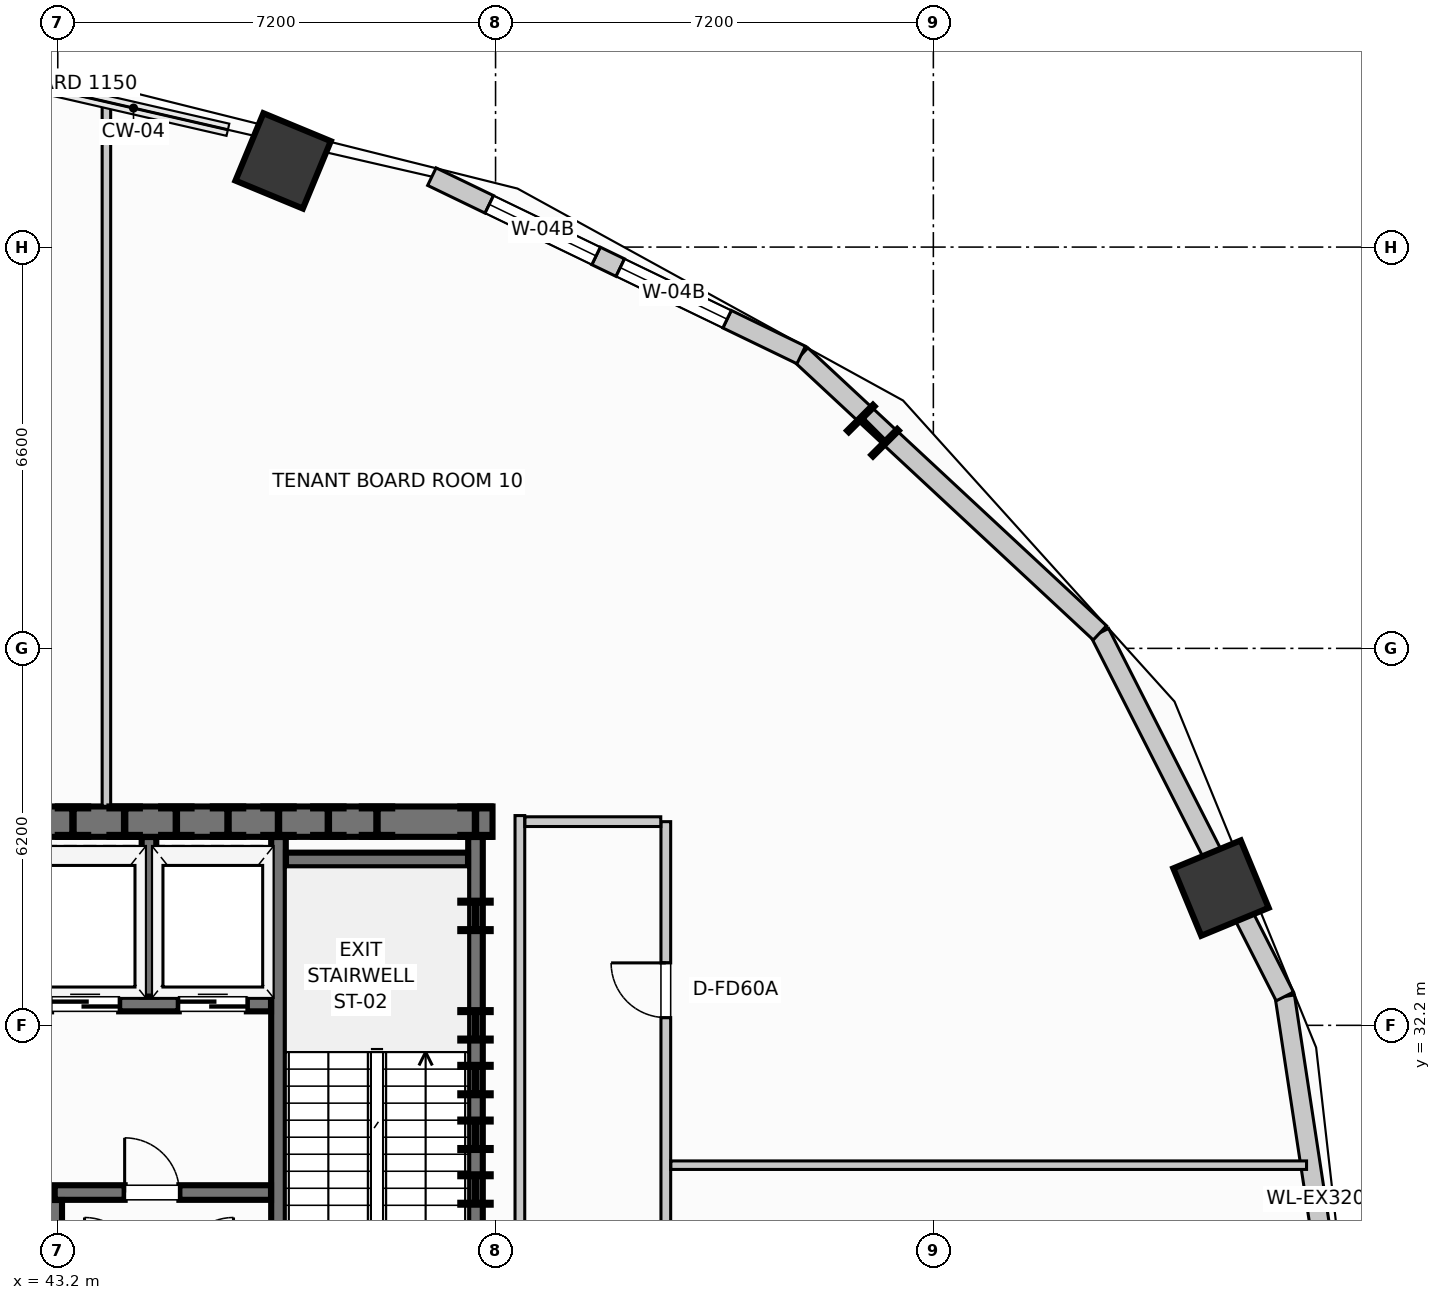
"""IFC4 building model, lengths in metres.
Left out: names, types, materials, properties, quantities, classifications, styles, units other than length and angle.
Written with IfcOpenShell. Run it as: python <this file> out.ifc"""

import sys

from ifc_helpers import new_model, si_unit, direction, frame, frame_2d, origin, origin_2d, place, context, subcontext, project, spatial, rectangle, i_section, extrude, element, fill, save


model = new_model("IFC4")
c1 = context("Model", 3, precision=1e-05, world=origin(), true_north=direction((0.0, 1.0)))
c2 = subcontext(c1, "Body", "Model", "MODEL_VIEW")
j1 = project(units=[si_unit("LENGTHUNIT", "METRE"), si_unit("PLANEANGLEUNIT", "RADIAN")], contexts=[c1])
p1 = place(None, origin())
s1 = spatial("IfcSite", under=j1, at=p1, CompositionType="ELEMENT")
p2 = place(p1, origin())
s2 = spatial("IfcBuilding", under=s1, at=p2, CompositionType="ELEMENT")
p3 = place(p2, frame((0.0, 0.0, 105.95)))
s3 = spatial("IfcBuildingStorey", under=s2, at=p3, CompositionType="ELEMENT", Elevation=105.95)
for number, where, z_axis, x_axis in (
    (1, (43.45, 35.55, 0.0), (0.0, 0.0, 1.0), (1.0, 0.0, 0.0)),
    (2, (45.15, 35.55, 0.0), (0.0, 0.0, 1.0), (1.0, 0.0, 0.0)),
    (3, (46.83, 35.55, 0.0), (0.0, 0.0, 1.0), (1.0, 0.0, 0.0)),
    (4, (48.45, 35.55, 0.0), (0.0, 0.0, 1.0), (1.0, 0.0, 0.0)),
    (5, (50.07, 35.55, 0.0), (0.0, 0.0, 1.0), (1.0, 0.0, 0.0)),
    (6, (50.07, 30.4, 0.0), (0.0, 0.0, 1.0), (1.0, 0.0, 0.0)),
    (7, (50.07, 32.2, 0.0), (0.0, 0.0, 1.0), (1.0, 0.0, 0.0)),
    (8, (50.07, 34.0, 0.0), (0.0, 0.0, 1.0), (1.0, 0.0, 0.0)),
    (9, (47.65, 35.55, 0.0), (0.0, 0.0, 1.0), (1.0, 0.0, 0.0)),
    (10, (44.3, 35.55, 0.0), (0.0, 0.0, 1.0), (1.0, 0.0, 0.0)),
    (11, (46.0, 35.55, 0.0), (0.0, 0.0, 1.0), (1.0, 0.0, 0.0)),
    (12, (50.07, 29.5, 0.0), (0.0, 0.0, 1.0), (1.0, 0.0, 0.0)),
    (13, (50.07, 31.3, 0.0), (0.0, 0.0, 1.0), (1.0, 0.0, 0.0)),
):
    element("IfcColumn", number, at=place(p3, frame(where, z_axis=z_axis, x_axis=x_axis)), inside=s3, PredefinedType="COLUMN", context=c2, shape_type="SweptSolid", body=[
        extrude(i_section(OverallWidth=0.5, OverallDepth=0.5, WebThickness=0.022, FlangeThickness=0.032, at=origin_2d()), origin(), (0.0, 0.0, 1.0), 4.5),
    ])
p4 = place(p3, frame((62.331, 34.457, 0.0), z_axis=(0.0, 0.0, 1.0), x_axis=(0.923879532511, 0.382683432365, 0.0)))
e14 = element("IfcColumn", 14, at=p4, inside=s3, PredefinedType="COLUMN", context=c2, shape_type="SweptSolid", body=[
    extrude(rectangle(XDim=1.2, YDim=1.2, at=origin_2d()), origin(), (0.0, 0.0, 1.0), 4.5),
])
p5 = place(p3, frame((56.607, 41.982, 0.0), z_axis=(0.0, 0.0, 1.0), x_axis=(0.707106781187, 0.707106781187, 0.0)))
e15 = element("IfcColumn", 15, at=p5, inside=s3, PredefinedType="COLUMN", context=c2, shape_type="SweptSolid", body=[
    extrude(i_section(OverallWidth=0.6, OverallDepth=0.6, WebThickness=0.025, FlangeThickness=0.036, at=origin_2d()), origin(), (0.0, 0.0, 1.0), 4.5),
])
p6 = place(p3, frame((46.906, 46.418, 0.0), z_axis=(0.0, 0.0, 1.0), x_axis=(0.382683432365, 0.923879532511, 0.0)))
e16 = element("IfcColumn", 16, at=p6, inside=s3, PredefinedType="COLUMN", context=c2, shape_type="SweptSolid", body=[
    extrude(rectangle(XDim=1.2, YDim=1.2, at=origin_2d()), origin(), (0.0, 0.0, 1.0), 4.5),
])
p7 = place(p3, frame((64.398, 26.0, 0.0), z_axis=(0.0, 0.0, 1.0), x_axis=(-0.150633288003, 0.988589708901, 0.0)))
e17 = element("IfcWall", 17, at=p7, inside=s3, PredefinedType="STANDARD", context=c2, shape_type="SweptSolid", body=[
    extrude(rectangle(XDim=6.752, YDim=0.32, at=frame_2d((3.376, 0.0))), origin(), (0.0, 0.0, 1.0), 4.26),
])
p8 = place(p3, frame((63.381, 32.675, 0.0), z_axis=(0.0, 0.0, 1.0), x_axis=(-0.453374078001, 0.89132033826, 0.0)))
e18 = element("IfcWall", 18, at=p8, inside=s3, PredefinedType="STANDARD", context=c2, shape_type="SweptSolid", body=[
    extrude(rectangle(XDim=6.71, YDim=0.32, at=frame_2d((3.355, 0.0))), origin(), (0.0, 0.0, 1.0), 3.619),
])
p9 = place(p3, frame((60.339, 38.656, 0.0), z_axis=(0.0, 0.0, 1.0), x_axis=(-0.732137360086, 0.681157020052, 0.0)))
e19 = element("IfcWall", 19, at=p9, inside=s3, PredefinedType="STANDARD", context=c2, shape_type="SweptSolid", body=[
    extrude(rectangle(XDim=6.709, YDim=0.32, at=frame_2d((3.354, 0.0))), origin(), (0.0, 0.0, 1.0), 3.619),
])
p10 = place(p3, frame((55.427, 43.226, 0.0), z_axis=(0.0, 0.0, 1.0), x_axis=(-0.900510094661, 0.434835106004, 0.0)))
e20 = element("IfcWall", 20, at=p10, inside=s3, PredefinedType="STANDARD", context=c2, shape_type="SweptSolid", body=[
    extrude(rectangle(XDim=6.745, YDim=0.32, at=frame_2d((3.373, 0.0))), origin(), (0.0, 0.0, 1.0), 4.26),
])
p11 = place(p10, frame((1.354, 0.0, 0.75)))
e21 = element("IfcOpeningElement", 21, at=p11, cuts=e20, PredefinedType="OPENING", context=c2, shape_type="SweptSolid", body=[
    extrude(rectangle(XDim=1.95, YDim=1.68, at=frame_2d((0.975, 0.84))), frame((0.0, 0.17, 0.0), z_axis=(0.0, -1.0, 0.0), x_axis=(1.0, 0.0, 0.0)), (0.0, 0.0, 1.0), 0.34),
])
p12 = place(p10, frame((3.746, 0.0, 0.75)))
e22 = element("IfcOpeningElement", 22, at=p12, cuts=e20, PredefinedType="OPENING", context=c2, shape_type="SweptSolid", body=[
    extrude(rectangle(XDim=1.95, YDim=1.68, at=frame_2d((0.975, 0.84))), frame((0.0, 0.17, 0.0), z_axis=(0.0, -1.0, 0.0), x_axis=(1.0, 0.0, 0.0)), (0.0, 0.0, 1.0), 0.34),
])
p13 = place(p3, frame((50.35, 35.55, 0.0), z_axis=(0.0, 0.0, 1.0), x_axis=(-1.0, 0.0, 0.0)))
e23 = element("IfcWall", 23, at=p13, inside=s3, PredefinedType="SHEAR", context=c2, shape_type="SweptSolid", body=[
    extrude(rectangle(XDim=28.7, YDim=0.5, at=frame_2d((14.35, 0.0))), origin(), (0.0, 0.0, 1.0), 4.5),
])
for number, where, z_axis, x_axis in (
    (24, (50.07, 27.003, 0.0), (0.0, 0.0, 1.0), (0.0, 1.0, 0.0)),
    (25, (46.83, 27.003, 0.0), (0.0, 0.0, 1.0), (0.0, 1.0, 0.0)),
):
    element("IfcWall", number, at=place(p3, frame(where, z_axis=z_axis, x_axis=x_axis)), inside=s3, PredefinedType="SHEAR", context=c2, shape_type="SweptSolid", body=[
        extrude(rectangle(XDim=8.294, YDim=0.24, at=frame_2d((4.147, 0.0))), origin(), (0.0, 0.0, 1.0), 4.5),
    ])
p14 = place(p3, frame((46.953, 34.92, 0.0), z_axis=(0.0, 0.0, 1.0), x_axis=(1.0, 0.0, 0.0)))
e26 = element("IfcWall", 26, at=p14, inside=s3, PredefinedType="SHEAR", context=c2, shape_type="SweptSolid", body=[
    extrude(rectangle(XDim=2.994, YDim=0.24, at=frame_2d((1.497, 0.0))), origin(), (0.0, 0.0, 1.0), 4.5),
])
p15 = place(p3, frame((33.493, 32.55, 0.0), z_axis=(0.0, 0.0, 1.0), x_axis=(1.0, 0.0, 0.0)))
e27 = element("IfcWall", 27, at=p15, inside=s3, PredefinedType="SHEAR", context=c2, shape_type="SweptSolid", body=[
    extrude(rectangle(XDim=13.214, YDim=0.24, at=frame_2d((6.607, 0.0))), origin(), (0.0, 0.0, 1.0), 4.5),
])
p16 = place(p15, frame((0.447, 0.0, 0.0)))
e28 = element("IfcOpeningElement", 28, at=p16, cuts=e27, PredefinedType="OPENING", context=c2, shape_type="SweptSolid", body=[
    extrude(rectangle(XDim=1.12, YDim=2.0, at=frame_2d((0.56, 1.0))), frame((0.0, 0.13, 0.0), z_axis=(0.0, -1.0, 0.0), x_axis=(1.0, 0.0, 0.0)), (0.0, 0.0, 1.0), 0.26),
])
p17 = place(p15, frame((2.547, 0.0, 0.0)))
e29 = element("IfcOpeningElement", 29, at=p17, cuts=e27, PredefinedType="OPENING", context=c2, shape_type="SweptSolid", body=[
    extrude(rectangle(XDim=1.12, YDim=2.0, at=frame_2d((0.56, 1.0))), frame((0.0, 0.13, 0.0), z_axis=(0.0, -1.0, 0.0), x_axis=(1.0, 0.0, 0.0)), (0.0, 0.0, 1.0), 0.26),
])
p18 = place(p15, frame((4.647, 0.0, 0.0)))
e30 = element("IfcOpeningElement", 30, at=p18, cuts=e27, PredefinedType="OPENING", context=c2, shape_type="SweptSolid", body=[
    extrude(rectangle(XDim=1.12, YDim=2.0, at=frame_2d((0.56, 1.0))), frame((0.0, 0.13, 0.0), z_axis=(0.0, -1.0, 0.0), x_axis=(1.0, 0.0, 0.0)), (0.0, 0.0, 1.0), 0.26),
])
p19 = place(p15, frame((7.497, 0.0, 0.0)))
e31 = element("IfcOpeningElement", 31, at=p19, cuts=e27, PredefinedType="OPENING", context=c2, shape_type="SweptSolid", body=[
    extrude(rectangle(XDim=1.12, YDim=2.0, at=frame_2d((0.56, 1.0))), frame((0.0, 0.13, 0.0), z_axis=(0.0, -1.0, 0.0), x_axis=(1.0, 0.0, 0.0)), (0.0, 0.0, 1.0), 0.26),
])
p20 = place(p15, frame((9.597, 0.0, 0.0)))
e32 = element("IfcOpeningElement", 32, at=p20, cuts=e27, PredefinedType="OPENING", context=c2, shape_type="SweptSolid", body=[
    extrude(rectangle(XDim=1.12, YDim=2.0, at=frame_2d((0.56, 1.0))), frame((0.0, 0.13, 0.0), z_axis=(0.0, -1.0, 0.0), x_axis=(1.0, 0.0, 0.0)), (0.0, 0.0, 1.0), 0.26),
])
p21 = place(p15, frame((11.697, 0.0, 0.0)))
e33 = element("IfcOpeningElement", 33, at=p21, cuts=e27, PredefinedType="OPENING", context=c2, shape_type="SweptSolid", body=[
    extrude(rectangle(XDim=1.12, YDim=2.0, at=frame_2d((0.56, 1.0))), frame((0.0, 0.13, 0.0), z_axis=(0.0, -1.0, 0.0), x_axis=(1.0, 0.0, 0.0)), (0.0, 0.0, 1.0), 0.26),
])
p22 = place(p3, frame((43.15, 29.45, 0.0), z_axis=(0.0, 0.0, 1.0), x_axis=(1.0, 0.0, 0.0)))
e34 = element("IfcWall", 34, at=p22, inside=s3, PredefinedType="SHEAR", context=c2, shape_type="SweptSolid", body=[
    extrude(rectangle(XDim=3.557, YDim=0.24, at=frame_2d((1.779, 0.0))), origin(), (0.0, 0.0, 1.0), 4.5),
])
p23 = place(p22, frame((1.15, 0.0, 0.0)))
e35 = element("IfcOpeningElement", 35, at=p23, cuts=e34, PredefinedType="OPENING", context=c2, shape_type="SweptSolid", body=[
    extrude(rectangle(XDim=0.9, YDim=2.0, at=frame_2d((0.45, 1.0))), frame((0.0, 0.13, 0.0), z_axis=(0.0, -1.0, 0.0), x_axis=(1.0, 0.0, 0.0)), (0.0, 0.0, 1.0), 0.26),
])
p24 = place(p3, frame((43.15, 27.003, 0.0), z_axis=(0.0, 0.0, 1.0), x_axis=(0.0, 1.0, 0.0)))
e36 = element("IfcWall", 36, at=p24, inside=s3, PredefinedType="SHEAR", context=c2, shape_type="SweptSolid", body=[
    extrude(rectangle(XDim=2.324, YDim=0.24, at=frame_2d((1.162, 0.0))), origin(), (0.0, 0.0, 1.0), 4.5),
])
p25 = place(p3, frame((44.7, 32.673, 0.0), z_axis=(0.0, 0.0, 1.0), x_axis=(0.0, 1.0, 0.0)))
e37 = element("IfcWall", 37, at=p25, inside=s3, PredefinedType="SHEAR", context=c2, shape_type="SweptSolid", body=[
    extrude(rectangle(XDim=2.624, YDim=0.24, at=frame_2d((1.312, 0.0))), origin(), (0.0, 0.0, 1.0), 4.5),
])
p26 = place(p3, frame((53.2, 19.8, 0.0), z_axis=(0.0, 0.0, 1.0), x_axis=(0.0, 1.0, 0.0)))
e38 = element("IfcWall", 38, at=p26, inside=s3, PredefinedType="PARTITIONING", context=c2, shape_type="SweptSolid", body=[
    extrude(rectangle(XDim=15.75, YDim=0.16, at=frame_2d((7.875, 0.0))), origin(), (0.0, 0.0, 1.0), 4.245),
])
p27 = place(p26, frame((3.334, 0.0, 0.0)))
e39 = element("IfcOpeningElement", 39, at=p27, cuts=e38, PredefinedType="OPENING", context=c2, shape_type="SweptSolid", body=[
    extrude(rectangle(XDim=0.9, YDim=2.0, at=frame_2d((0.45, 1.0))), frame((0.0, 0.09, 0.0), z_axis=(0.0, -1.0, 0.0), x_axis=(1.0, 0.0, 0.0)), (0.0, 0.0, 1.0), 0.18),
])
p28 = place(p26, frame((12.527, 0.0, 0.0)))
e40 = element("IfcOpeningElement", 40, at=p28, cuts=e38, PredefinedType="OPENING", context=c2, shape_type="SweptSolid", body=[
    extrude(rectangle(XDim=0.9, YDim=2.0, at=frame_2d((0.45, 1.0))), frame((0.0, 0.09, 0.0), z_axis=(0.0, -1.0, 0.0), x_axis=(1.0, 0.0, 0.0)), (0.0, 0.0, 1.0), 0.18),
])
p29 = place(p3, frame((50.8, 26.65, 0.0), z_axis=(0.0, 0.0, 1.0), x_axis=(0.0, 1.0, 0.0)))
e41 = element("IfcWall", 41, at=p29, inside=s3, PredefinedType="PARTITIONING", context=c2, shape_type="SweptSolid", body=[
    extrude(rectangle(XDim=9.0, YDim=0.16, at=frame_2d((4.5, 0.0))), origin(), (0.0, 0.0, 1.0), 4.245),
])
p30 = place(p3, frame((50.883, 35.55, 0.0), z_axis=(0.0, 0.0, 1.0), x_axis=(1.0, 0.0, 0.0)))
e42 = element("IfcWall", 42, at=p30, inside=s3, PredefinedType="PARTITIONING", context=c2, shape_type="SweptSolid", body=[
    extrude(rectangle(XDim=2.234, YDim=0.16, at=frame_2d((1.117, 0.0))), origin(), (0.0, 0.0, 1.0), 4.245),
])
p31 = place(p3, frame((53.283, 29.9, 0.0), z_axis=(0.0, 0.0, 1.0), x_axis=(1.0, 0.0, 0.0)))
e43 = element("IfcWall", 43, at=p31, inside=s3, PredefinedType="PARTITIONING", context=c2, shape_type="SweptSolid", body=[
    extrude(rectangle(XDim=10.455, YDim=0.14, at=frame_2d((5.227, 0.0))), origin(), (0.0, 0.0, 1.0), 4.245),
])
p32 = place(p3, frame((44.0, 35.803, 0.0), z_axis=(0.0, 0.0, 1.0), x_axis=(0.0, 1.0, 0.0)))
e44 = element("IfcWall", 44, at=p32, inside=s3, PredefinedType="PARTITIONING", context=c2, shape_type="SweptSolid", body=[
    extrude(rectangle(XDim=11.519, YDim=0.14, at=frame_2d((5.76, 0.0))), origin(), (0.0, 0.0, 1.0), 4.245),
])
p33 = place(p11, origin())
e45 = element("IfcWindow", 45, at=p33, inside=s3, PartitioningType="SINGLE_PANEL", PredefinedType="WINDOW", context=c2, shape_type="SweptSolid", body=[
    extrude(rectangle(XDim=1.95, YDim=1.68, at=frame_2d((0.975, 0.84))), frame((0.0, 0.03, 0.0), z_axis=(0.0, -1.0, 0.0), x_axis=(1.0, 0.0, 0.0)), (0.0, 0.0, 1.0), 0.06),
])
fill(e21, e45)
p34 = place(p12, origin())
e46 = element("IfcWindow", 46, at=p34, inside=s3, PartitioningType="SINGLE_PANEL", PredefinedType="WINDOW", context=c2, shape_type="SweptSolid", body=[
    extrude(rectangle(XDim=1.95, YDim=1.68, at=frame_2d((0.975, 0.84))), frame((0.0, 0.03, 0.0), z_axis=(0.0, -1.0, 0.0), x_axis=(1.0, 0.0, 0.0)), (0.0, 0.0, 1.0), 0.06),
])
fill(e22, e46)
p35 = place(p23, origin())
e47 = element("IfcDoor", 47, at=p35, inside=s3, OperationType="SINGLE_SWING_LEFT", PredefinedType="DOOR", context=c2, shape_type="SweptSolid", body=[
    extrude(rectangle(XDim=0.9, YDim=2.0, at=frame_2d((0.45, 1.0))), frame((0.0, 0.025, 0.0), z_axis=(0.0, -1.0, 0.0), x_axis=(1.0, 0.0, 0.0)), (0.0, 0.0, 1.0), 0.05),
])
fill(e35, e47)
p36 = place(p20, origin())
e48 = element("IfcDoor", 48, at=p36, inside=s3, OperationType="DOUBLE_DOOR_SLIDING", PredefinedType="USERDEFINED", context=c2, shape_type="SweptSolid", body=[
    extrude(rectangle(XDim=1.12, YDim=2.0, at=frame_2d((0.56, 1.0))), frame((0.0, 0.025, 0.0), z_axis=(0.0, -1.0, 0.0), x_axis=(1.0, 0.0, 0.0)), (0.0, 0.0, 1.0), 0.05),
])
fill(e32, e48)
p37 = place(p21, origin())
e49 = element("IfcDoor", 49, at=p37, inside=s3, OperationType="DOUBLE_DOOR_SLIDING", PredefinedType="USERDEFINED", context=c2, shape_type="SweptSolid", body=[
    extrude(rectangle(XDim=1.12, YDim=2.0, at=frame_2d((0.56, 1.0))), frame((0.0, 0.025, 0.0), z_axis=(0.0, -1.0, 0.0), x_axis=(1.0, 0.0, 0.0)), (0.0, 0.0, 1.0), 0.05),
])
fill(e33, e49)
p38 = place(p28, origin())
e50 = element("IfcDoor", 50, at=p38, inside=s3, OperationType="SINGLE_SWING_RIGHT", PredefinedType="DOOR", context=c2, shape_type="SweptSolid", body=[
    extrude(rectangle(XDim=0.9, YDim=2.0, at=frame_2d((0.45, 1.0))), frame((0.0, 0.025, 0.0), z_axis=(0.0, -1.0, 0.0), x_axis=(1.0, 0.0, 0.0)), (0.0, 0.0, 1.0), 0.05),
])
fill(e40, e50)
save(model, sys.argv[1])
